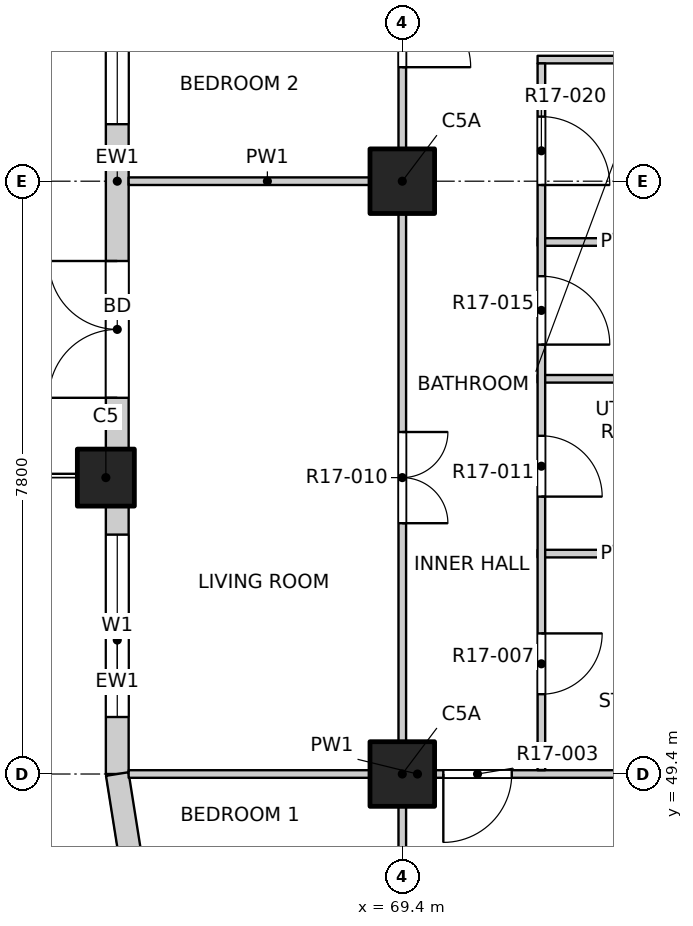
"""IFC4 building model, lengths in metres.
Left out: names, types, materials, properties, quantities, classifications, styles, units other than length and angle.
Written with IfcOpenShell. Run it as: python <this file> out.ifc"""

import sys

from ifc_helpers import new_model, si_unit, direction, frame, frame_2d, origin, origin_2d, place, context, subcontext, project, spatial, rectangle, extrude, element, fill, save


model = new_model("IFC4")
c1 = context("Model", 3, precision=1e-05, world=origin(), true_north=direction((0.0, 1.0)))
c2 = subcontext(c1, "Body", "Model", "MODEL_VIEW")
j1 = project(units=[si_unit("LENGTHUNIT", "METRE"), si_unit("PLANEANGLEUNIT", "RADIAN")], contexts=[c1])
p1 = place(None, origin())
s1 = spatial("IfcSite", under=j1, at=p1, CompositionType="ELEMENT")
p2 = place(p1, origin())
s2 = spatial("IfcBuilding", under=s1, at=p2, CompositionType="ELEMENT")
p3 = place(p2, frame((0.0, 0.0, 179.2)))
s3 = spatial("IfcBuildingStorey", under=s2, at=p3, CompositionType="ELEMENT", Elevation=179.2)
p4 = place(p3, frame((65.5, 53.3, -0.3), z_axis=(0.0, 0.0, 1.0), x_axis=(1.0, 0.0, 0.0)))
e1 = element("IfcColumn", 1, at=p4, inside=s3, PredefinedType="COLUMN", context=c2, shape_type="SweptSolid", body=[
    extrude(rectangle(XDim=0.75, YDim=0.75, at=origin_2d()), origin(), (0.0, 0.0, 1.0), 3.45),
])
for number, where, z_axis, x_axis in (
    (2, (69.4, 49.4, -0.3), (0.0, 0.0, 1.0), (1.0, 0.0, 0.0)),
    (3, (69.4, 57.2, -0.3), (0.0, 0.0, 1.0), (1.0, 0.0, 0.0)),
):
    element("IfcColumn", number, at=place(p3, frame(where, z_axis=z_axis, x_axis=x_axis)), inside=s3, PredefinedType="COLUMN", context=c2, shape_type="SweptSolid", body=[
        extrude(rectangle(XDim=0.85, YDim=0.85, at=origin_2d()), origin(), (0.0, 0.0, 1.0), 3.45),
    ])
p5 = place(p3, frame((65.65, 49.4, 0.0), z_axis=(0.0, 0.0, 1.0), x_axis=(0.0, 1.0, 0.0)))
e4 = element("IfcWall", 4, at=p5, inside=s3, PredefinedType="SOLIDWALL", context=c2, shape_type="SweptSolid", body=[
    extrude(rectangle(XDim=3.525, YDim=0.3, at=frame_2d((1.763, 0.0))), origin(), (0.0, 0.0, 1.0), 2.7),
])
p6 = place(p5, frame((0.75, 0.0, 0.9)))
e5 = element("IfcOpeningElement", 5, at=p6, cuts=e4, PredefinedType="OPENING", context=c2, shape_type="SweptSolid", body=[
    extrude(rectangle(XDim=2.4, YDim=1.8, at=frame_2d((1.2, 0.9))), frame((0.0, 0.16, 0.0), z_axis=(0.0, -1.0, 0.0), x_axis=(1.0, 0.0, 0.0)), (0.0, 0.0, 1.0), 0.32),
])
p7 = place(p3, frame((65.65, 53.675, 0.0), z_axis=(0.0, 0.0, 1.0), x_axis=(0.0, 1.0, 0.0)))
e6 = element("IfcWall", 6, at=p7, inside=s3, PredefinedType="SOLIDWALL", context=c2, shape_type="SweptSolid", body=[
    extrude(rectangle(XDim=7.05, YDim=0.3, at=frame_2d((3.525, 0.0))), origin(), (0.0, 0.0, 1.0), 2.7),
])
p8 = place(p7, frame((0.675, 0.0, 0.0)))
e7 = element("IfcOpeningElement", 7, at=p8, cuts=e6, PredefinedType="OPENING", context=c2, shape_type="SweptSolid", body=[
    extrude(rectangle(XDim=1.8, YDim=2.4, at=frame_2d((0.9, 1.2))), frame((0.0, 0.16, 0.0), z_axis=(0.0, -1.0, 0.0), x_axis=(1.0, 0.0, 0.0)), (0.0, 0.0, 1.0), 0.32),
])
p9 = place(p7, frame((4.275, 0.0, 0.9)))
e8 = element("IfcOpeningElement", 8, at=p9, cuts=e6, PredefinedType="OPENING", context=c2, shape_type="SweptSolid", body=[
    extrude(rectangle(XDim=2.4, YDim=1.8, at=frame_2d((1.2, 0.9))), frame((0.0, 0.16, 0.0), z_axis=(0.0, -1.0, 0.0), x_axis=(1.0, 0.0, 0.0)), (0.0, 0.0, 1.0), 0.32),
])
p10 = place(p3, frame((65.65, 49.4, 0.0), z_axis=(0.0, 0.0, 1.0), x_axis=(0.156496880861, -0.987678452879, 0.0)))
e9 = element("IfcWall", 9, at=p10, inside=s3, PredefinedType="SOLIDWALL", context=c2, shape_type="SweptSolid", body=[
    extrude(rectangle(XDim=1.173, YDim=0.3, at=frame_2d((0.586, 0.0))), origin(), (0.0, 0.0, 1.0), 2.7),
])
p11 = place(p3, frame((65.8, 49.4, 0.0), z_axis=(0.0, 0.0, 1.0), x_axis=(1.0, 0.0, 0.0)))
e10 = element("IfcWall", 10, at=p11, inside=s3, PredefinedType="PARTITIONING", context=c2, shape_type="SweptSolid", body=[
    extrude(rectangle(XDim=7.6, YDim=0.1, at=frame_2d((3.8, 0.0))), origin(), (0.0, 0.0, 1.0), 3.15),
])
p12 = place(p11, frame((4.14, 0.0, 0.0)))
e11 = element("IfcOpeningElement", 11, at=p12, cuts=e10, PredefinedType="OPENING", context=c2, shape_type="SweptSolid", body=[
    extrude(rectangle(XDim=0.9, YDim=2.1, at=frame_2d((0.45, 1.05))), frame((0.0, 0.06, 0.0), z_axis=(0.0, -1.0, 0.0), x_axis=(1.0, 0.0, 0.0)), (0.0, 0.0, 1.0), 0.12),
])
for number, where, z_axis, x_axis in (
    (12, (71.18, 52.3, 0.0), (0.0, 0.0, 1.0), (1.0, 0.0, 0.0)),
    (13, (71.18, 54.6, 0.0), (0.0, 0.0, 1.0), (1.0, 0.0, 0.0)),
    (14, (71.18, 56.4, 0.0), (0.0, 0.0, 1.0), (1.0, 0.0, 0.0)),
):
    element("IfcWall", number, at=place(p3, frame(where, z_axis=z_axis, x_axis=x_axis)), inside=s3, PredefinedType="PARTITIONING", context=c2, shape_type="SweptSolid", body=[
        extrude(rectangle(XDim=2.22, YDim=0.1, at=frame_2d((1.11, 0.0))), origin(), (0.0, 0.0, 1.0), 3.15),
    ])
p13 = place(p3, frame((65.8, 57.2, 0.0), z_axis=(0.0, 0.0, 1.0), x_axis=(1.0, 0.0, 0.0)))
e15 = element("IfcWall", 15, at=p13, inside=s3, PredefinedType="PARTITIONING", context=c2, shape_type="SweptSolid", body=[
    extrude(rectangle(XDim=3.65, YDim=0.1, at=frame_2d((1.825, 0.0))), origin(), (0.0, 0.0, 1.0), 3.15),
])
p14 = place(p3, frame((71.18, 58.8, 0.0), z_axis=(0.0, 0.0, 1.0), x_axis=(1.0, 0.0, 0.0)))
e16 = element("IfcWall", 16, at=p14, inside=s3, PredefinedType="PARTITIONING", context=c2, shape_type="SweptSolid", body=[
    extrude(rectangle(XDim=2.22, YDim=0.1, at=frame_2d((1.11, 0.0))), origin(), (0.0, 0.0, 1.0), 3.15),
])
p15 = place(p3, frame((69.4, 45.8, 0.0), z_axis=(0.0, 0.0, 1.0), x_axis=(0.0, 1.0, 0.0)))
e17 = element("IfcWall", 17, at=p15, inside=s3, PredefinedType="PARTITIONING", context=c2, shape_type="SweptSolid", body=[
    extrude(rectangle(XDim=38.4, YDim=0.1, at=frame_2d((19.2, 0.0))), origin(), (0.0, 0.0, 1.0), 3.15),
])
p16 = place(p15, frame((1.05, 0.0, 0.0)))
e18 = element("IfcOpeningElement", 18, at=p16, cuts=e17, PredefinedType="OPENING", context=c2, shape_type="SweptSolid", body=[
    extrude(rectangle(XDim=1.2, YDim=2.1, at=frame_2d((0.6, 1.05))), frame((0.0, 0.06, 0.0), z_axis=(0.0, -1.0, 0.0), x_axis=(1.0, 0.0, 0.0)), (0.0, 0.0, 1.0), 0.12),
])
p17 = place(p15, frame((6.9, 0.0, 0.0)))
e19 = element("IfcOpeningElement", 19, at=p17, cuts=e17, PredefinedType="OPENING", context=c2, shape_type="SweptSolid", body=[
    extrude(rectangle(XDim=1.2, YDim=2.1, at=frame_2d((0.6, 1.05))), frame((0.0, 0.06, 0.0), z_axis=(0.0, -1.0, 0.0), x_axis=(1.0, 0.0, 0.0)), (0.0, 0.0, 1.0), 0.12),
])
p18 = place(p15, frame((12.9, 0.0, 0.0)))
e20 = element("IfcOpeningElement", 20, at=p18, cuts=e17, PredefinedType="OPENING", context=c2, shape_type="SweptSolid", body=[
    extrude(rectangle(XDim=0.9, YDim=2.1, at=frame_2d((0.45, 1.05))), frame((0.0, 0.06, 0.0), z_axis=(0.0, -1.0, 0.0), x_axis=(1.0, 0.0, 0.0)), (0.0, 0.0, 1.0), 0.12),
])
p19 = place(p15, frame((16.8, 0.0, 0.0)))
e21 = element("IfcOpeningElement", 21, at=p19, cuts=e17, PredefinedType="OPENING", context=c2, shape_type="SweptSolid", body=[
    extrude(rectangle(XDim=0.9, YDim=2.1, at=frame_2d((0.45, 1.05))), frame((0.0, 0.06, 0.0), z_axis=(0.0, -1.0, 0.0), x_axis=(1.0, 0.0, 0.0)), (0.0, 0.0, 1.0), 0.12),
])
p20 = place(p15, frame((20.7, 0.0, 0.0)))
e22 = element("IfcOpeningElement", 22, at=p20, cuts=e17, PredefinedType="OPENING", context=c2, shape_type="SweptSolid", body=[
    extrude(rectangle(XDim=0.9, YDim=2.1, at=frame_2d((0.45, 1.05))), frame((0.0, 0.06, 0.0), z_axis=(0.0, -1.0, 0.0), x_axis=(1.0, 0.0, 0.0)), (0.0, 0.0, 1.0), 0.12),
])
p21 = place(p15, frame((24.6, 0.0, 0.0)))
e23 = element("IfcOpeningElement", 23, at=p21, cuts=e17, PredefinedType="OPENING", context=c2, shape_type="SweptSolid", body=[
    extrude(rectangle(XDim=0.9, YDim=2.1, at=frame_2d((0.45, 1.05))), frame((0.0, 0.06, 0.0), z_axis=(0.0, -1.0, 0.0), x_axis=(1.0, 0.0, 0.0)), (0.0, 0.0, 1.0), 0.12),
])
p22 = place(p15, frame((28.5, 0.0, 0.0)))
e24 = element("IfcOpeningElement", 24, at=p22, cuts=e17, PredefinedType="OPENING", context=c2, shape_type="SweptSolid", body=[
    extrude(rectangle(XDim=0.9, YDim=2.1, at=frame_2d((0.45, 1.05))), frame((0.0, 0.06, 0.0), z_axis=(0.0, -1.0, 0.0), x_axis=(1.0, 0.0, 0.0)), (0.0, 0.0, 1.0), 0.12),
])
p23 = place(p15, frame((32.4, 0.0, 0.0)))
e25 = element("IfcOpeningElement", 25, at=p23, cuts=e17, PredefinedType="OPENING", context=c2, shape_type="SweptSolid", body=[
    extrude(rectangle(XDim=0.9, YDim=2.1, at=frame_2d((0.45, 1.05))), frame((0.0, 0.06, 0.0), z_axis=(0.0, -1.0, 0.0), x_axis=(1.0, 0.0, 0.0)), (0.0, 0.0, 1.0), 0.12),
])
p24 = place(p15, frame((36.15, 0.0, 0.0)))
e26 = element("IfcOpeningElement", 26, at=p24, cuts=e17, PredefinedType="OPENING", context=c2, shape_type="SweptSolid", body=[
    extrude(rectangle(XDim=1.2, YDim=2.1, at=frame_2d((0.6, 1.05))), frame((0.0, 0.06, 0.0), z_axis=(0.0, -1.0, 0.0), x_axis=(1.0, 0.0, 0.0)), (0.0, 0.0, 1.0), 0.12),
])
p25 = place(p3, frame((71.23, 49.45, 0.0), z_axis=(0.0, 0.0, 1.0), x_axis=(0.0, 1.0, 0.0)))
e27 = element("IfcWall", 27, at=p25, inside=s3, PredefinedType="PARTITIONING", context=c2, shape_type="SweptSolid", body=[
    extrude(rectangle(XDim=9.3, YDim=0.1, at=frame_2d((4.65, 0.0))), origin(), (0.0, 0.0, 1.0), 3.15),
])
p26 = place(p25, frame((1.0, 0.0, 0.0)))
e28 = element("IfcOpeningElement", 28, at=p26, cuts=e27, PredefinedType="OPENING", context=c2, shape_type="SweptSolid", body=[
    extrude(rectangle(XDim=0.8, YDim=2.1, at=frame_2d((0.4, 1.05))), frame((0.0, 0.06, 0.0), z_axis=(0.0, -1.0, 0.0), x_axis=(1.0, 0.0, 0.0)), (0.0, 0.0, 1.0), 0.12),
])
p27 = place(p25, frame((3.6, 0.0, 0.0)))
e29 = element("IfcOpeningElement", 29, at=p27, cuts=e27, PredefinedType="OPENING", context=c2, shape_type="SweptSolid", body=[
    extrude(rectangle(XDim=0.8, YDim=2.1, at=frame_2d((0.4, 1.05))), frame((0.0, 0.06, 0.0), z_axis=(0.0, -1.0, 0.0), x_axis=(1.0, 0.0, 0.0)), (0.0, 0.0, 1.0), 0.12),
])
p28 = place(p25, frame((5.6, 0.0, 0.0)))
e30 = element("IfcOpeningElement", 30, at=p28, cuts=e27, PredefinedType="OPENING", context=c2, shape_type="SweptSolid", body=[
    extrude(rectangle(XDim=0.9, YDim=2.1, at=frame_2d((0.45, 1.05))), frame((0.0, 0.06, 0.0), z_axis=(0.0, -1.0, 0.0), x_axis=(1.0, 0.0, 0.0)), (0.0, 0.0, 1.0), 0.12),
])
p29 = place(p25, frame((7.7, 0.0, 0.0)))
e31 = element("IfcOpeningElement", 31, at=p29, cuts=e27, PredefinedType="OPENING", context=c2, shape_type="SweptSolid", body=[
    extrude(rectangle(XDim=0.9, YDim=2.1, at=frame_2d((0.45, 1.05))), frame((0.0, 0.06, 0.0), z_axis=(0.0, -1.0, 0.0), x_axis=(1.0, 0.0, 0.0)), (0.0, 0.0, 1.0), 0.12),
])
p30 = place(p6, origin())
e32 = element("IfcWindow", 32, at=p30, inside=s3, PartitioningType="DOUBLE_PANEL_VERTICAL", PredefinedType="WINDOW", context=c2, shape_type="SweptSolid", body=[
    extrude(rectangle(XDim=2.4, YDim=1.8, at=frame_2d((1.2, 0.9))), frame((0.0, 0.03, 0.0), z_axis=(0.0, -1.0, 0.0), x_axis=(1.0, 0.0, 0.0)), (0.0, 0.0, 1.0), 0.06),
])
fill(e5, e32)
p31 = place(p8, origin())
e33 = element("IfcDoor", 33, at=p31, inside=s3, OperationType="DOUBLE_DOOR_SINGLE_SWING", PredefinedType="DOOR", context=c2, shape_type="SweptSolid", body=[
    extrude(rectangle(XDim=1.8, YDim=2.4, at=frame_2d((0.9, 1.2))), frame((0.0, 0.025, 0.0), z_axis=(0.0, -1.0, 0.0), x_axis=(1.0, 0.0, 0.0)), (0.0, 0.0, 1.0), 0.05),
])
fill(e7, e33)
p32 = place(p9, origin())
e34 = element("IfcWindow", 34, at=p32, inside=s3, PartitioningType="DOUBLE_PANEL_VERTICAL", PredefinedType="WINDOW", context=c2, shape_type="SweptSolid", body=[
    extrude(rectangle(XDim=2.4, YDim=1.8, at=frame_2d((1.2, 0.9))), frame((0.0, 0.03, 0.0), z_axis=(0.0, -1.0, 0.0), x_axis=(1.0, 0.0, 0.0)), (0.0, 0.0, 1.0), 0.06),
])
fill(e8, e34)
p33 = place(p12, origin())
e35 = element("IfcDoor", 35, at=p33, inside=s3, OperationType="SINGLE_SWING_RIGHT", PredefinedType="DOOR", context=c2, shape_type="SweptSolid", body=[
    extrude(rectangle(XDim=0.9, YDim=2.1, at=frame_2d((0.45, 1.05))), frame((0.0, 0.025, 0.0), z_axis=(0.0, -1.0, 0.0), x_axis=(1.0, 0.0, 0.0)), (0.0, 0.0, 1.0), 0.05),
])
fill(e11, e35)
p34 = place(p26, origin())
e36 = element("IfcDoor", 36, at=p34, inside=s3, OperationType="SINGLE_SWING_LEFT", PredefinedType="DOOR", context=c2, shape_type="SweptSolid", body=[
    extrude(rectangle(XDim=0.8, YDim=2.1, at=frame_2d((0.4, 1.05))), frame((0.0, 0.025, 0.0), z_axis=(0.0, -1.0, 0.0), x_axis=(1.0, 0.0, 0.0)), (0.0, 0.0, 1.0), 0.05),
])
fill(e28, e36)
p35 = place(p17, origin())
e37 = element("IfcDoor", 37, at=p35, inside=s3, OperationType="DOUBLE_DOOR_SINGLE_SWING", PredefinedType="DOOR", context=c2, shape_type="SweptSolid", body=[
    extrude(rectangle(XDim=1.2, YDim=2.1, at=frame_2d((0.6, 1.05))), frame((0.0, 0.025, 0.0), z_axis=(0.0, -1.0, 0.0), x_axis=(1.0, 0.0, 0.0)), (0.0, 0.0, 1.0), 0.05),
])
fill(e19, e37)
p36 = place(p27, origin())
e38 = element("IfcDoor", 38, at=p36, inside=s3, OperationType="SINGLE_SWING_RIGHT", PredefinedType="DOOR", context=c2, shape_type="SweptSolid", body=[
    extrude(rectangle(XDim=0.8, YDim=2.1, at=frame_2d((0.4, 1.05))), frame((0.0, 0.025, 0.0), z_axis=(0.0, -1.0, 0.0), x_axis=(1.0, 0.0, 0.0)), (0.0, 0.0, 1.0), 0.05),
])
fill(e29, e38)
p37 = place(p28, origin())
e39 = element("IfcDoor", 39, at=p37, inside=s3, OperationType="SINGLE_SWING_RIGHT", PredefinedType="DOOR", context=c2, shape_type="SweptSolid", body=[
    extrude(rectangle(XDim=0.9, YDim=2.1, at=frame_2d((0.45, 1.05))), frame((0.0, 0.025, 0.0), z_axis=(0.0, -1.0, 0.0), x_axis=(1.0, 0.0, 0.0)), (0.0, 0.0, 1.0), 0.05),
])
fill(e30, e39)
p38 = place(p29, origin())
e40 = element("IfcDoor", 40, at=p38, inside=s3, OperationType="SINGLE_SWING_RIGHT", PredefinedType="DOOR", context=c2, shape_type="SweptSolid", body=[
    extrude(rectangle(XDim=0.9, YDim=2.1, at=frame_2d((0.45, 1.05))), frame((0.0, 0.025, 0.0), z_axis=(0.0, -1.0, 0.0), x_axis=(1.0, 0.0, 0.0)), (0.0, 0.0, 1.0), 0.05),
])
fill(e31, e40)
p39 = place(p18, origin())
e41 = element("IfcDoor", 41, at=p39, inside=s3, OperationType="SINGLE_SWING_RIGHT", PredefinedType="DOOR", context=c2, shape_type="SweptSolid", body=[
    extrude(rectangle(XDim=0.9, YDim=2.1, at=frame_2d((0.45, 1.05))), frame((0.0, 0.025, 0.0), z_axis=(0.0, -1.0, 0.0), x_axis=(1.0, 0.0, 0.0)), (0.0, 0.0, 1.0), 0.05),
])
fill(e20, e41)
save(model, sys.argv[1])
